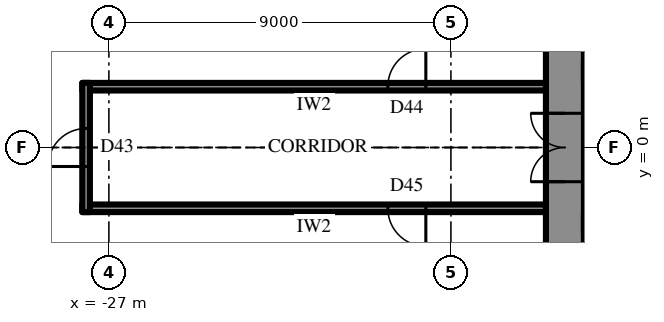
"""IFC4 building model, lengths in metres.
Left out: names, types, materials, properties, quantities, classifications, styles, units other than length and angle.
Written with IfcOpenShell. Run it as: python <this file> out.ifc"""

import sys

from ifc_helpers import new_model, si_unit, direction, frame, frame_2d, origin, place, context, subcontext, project, spatial, rectangle, extrude, element, fill, save


model = new_model("IFC4")
c1 = context("Model", 3, precision=1e-05, world=origin(), true_north=direction((0.0, 1.0)))
c2 = subcontext(c1, "Body", "Model", "MODEL_VIEW")
j1 = project(units=[si_unit("LENGTHUNIT", "METRE"), si_unit("PLANEANGLEUNIT", "RADIAN")], contexts=[c1])
p1 = place(None, origin())
s1 = spatial("IfcSite", under=j1, at=p1, CompositionType="ELEMENT")
p2 = place(p1, origin())
s2 = spatial("IfcBuilding", under=s1, at=p2, CompositionType="ELEMENT")
p3 = place(p2, frame((0.0, 0.0, 219.7)))
s3 = spatial("IfcBuildingStorey", under=s2, at=p3, CompositionType="ELEMENT", Elevation=219.7)
p4 = place(p3, frame((-15.0, 10.7, 0.0), z_axis=(0.0, 0.0, 1.0), x_axis=(0.0, -1.0, 0.0)))
e1 = element("IfcWall", 1, at=p4, inside=s3, PredefinedType="SHEAR", context=c2, shape_type="SweptSolid", body=[
    extrude(rectangle(XDim=21.4, YDim=1.0, at=frame_2d((10.7, 0.0))), origin(), (0.0, 0.0, 1.0), 4.2),
])
p5 = place(p4, frame((9.8, 0.0, 0.0)))
e2 = element("IfcOpeningElement", 2, at=p5, cuts=e1, PredefinedType="OPENING", context=c2, shape_type="SweptSolid", body=[
    extrude(rectangle(XDim=1.8, YDim=2.4, at=frame_2d((0.9, 1.2))), frame((0.0, 0.51, 0.0), z_axis=(0.0, -1.0, 0.0), x_axis=(1.0, 0.0, 0.0)), (0.0, 0.0, 1.0), 1.02),
])
p6 = place(p3, frame((-12.3, -2.0, 0.0), z_axis=(0.0, 0.0, 1.0), x_axis=(-1.0, 0.0, 0.0)))
e3 = element("IfcWall", 3, at=p6, inside=s3, PredefinedType="SHEAR", context=c2, shape_type="SweptSolid", body=[
    extrude(rectangle(XDim=2.2, YDim=0.5, at=frame_2d((1.1, 0.0))), origin(), (0.0, 0.0, 1.0), 4.2),
])
p7 = place(p6, frame((0.8, 0.0, 0.0)))
e4 = element("IfcOpeningElement", 4, at=p7, cuts=e3, PredefinedType="OPENING", context=c2, shape_type="SweptSolid", body=[
    extrude(rectangle(XDim=0.9, YDim=2.2, at=frame_2d((0.45, 1.1))), frame((0.0, 0.26, 0.0), z_axis=(0.0, -1.0, 0.0), x_axis=(1.0, 0.0, 0.0)), (0.0, 0.0, 1.0), 0.52),
])
p8 = place(p3, frame((-31.913, -2.425, 0.0), z_axis=(0.0, 0.0, 1.0), x_axis=(0.500001051461, -0.866024796723, 0.0)))
e5 = element("IfcWall", 5, at=p8, inside=s3, PredefinedType="SOLIDWALL", context=c2, shape_type="SweptSolid", body=[
    extrude(rectangle(XDim=27.713, YDim=0.3, at=frame_2d((13.856, 0.0))), origin(), (0.0, 0.0, 1.0), 2.0),
])
p9 = place(p8, frame((0.959, 0.0, 0.6)))
e6 = element("IfcOpeningElement", 6, at=p9, cuts=e5, PredefinedType="OPENING", context=c2, shape_type="SweptSolid", body=[
    extrude(rectangle(XDim=2.7, YDim=1.15, at=frame_2d((1.35, 0.575))), frame((0.0, 0.16, 0.0), z_axis=(0.0, -1.0, 0.0), x_axis=(1.0, 0.0, 0.0)), (0.0, 0.0, 1.0), 0.32),
])
p10 = place(p8, frame((5.578, 0.0, 0.6)))
e7 = element("IfcOpeningElement", 7, at=p10, cuts=e5, PredefinedType="OPENING", context=c2, shape_type="SweptSolid", body=[
    extrude(rectangle(XDim=2.7, YDim=1.15, at=frame_2d((1.35, 0.575))), frame((0.0, 0.16, 0.0), z_axis=(0.0, -1.0, 0.0), x_axis=(1.0, 0.0, 0.0)), (0.0, 0.0, 1.0), 0.32),
])
p11 = place(p8, frame((10.197, 0.0, 0.6)))
e8 = element("IfcOpeningElement", 8, at=p11, cuts=e5, PredefinedType="OPENING", context=c2, shape_type="SweptSolid", body=[
    extrude(rectangle(XDim=2.7, YDim=1.15, at=frame_2d((1.35, 0.575))), frame((0.0, 0.16, 0.0), z_axis=(0.0, -1.0, 0.0), x_axis=(1.0, 0.0, 0.0)), (0.0, 0.0, 1.0), 0.32),
])
p12 = place(p8, frame((14.816, 0.0, 0.6)))
e9 = element("IfcOpeningElement", 9, at=p12, cuts=e5, PredefinedType="OPENING", context=c2, shape_type="SweptSolid", body=[
    extrude(rectangle(XDim=2.7, YDim=1.15, at=frame_2d((1.35, 0.575))), frame((0.0, 0.16, 0.0), z_axis=(0.0, -1.0, 0.0), x_axis=(1.0, 0.0, 0.0)), (0.0, 0.0, 1.0), 0.32),
])
p13 = place(p8, frame((19.435, 0.0, 0.6)))
e10 = element("IfcOpeningElement", 10, at=p13, cuts=e5, PredefinedType="OPENING", context=c2, shape_type="SweptSolid", body=[
    extrude(rectangle(XDim=2.7, YDim=1.15, at=frame_2d((1.35, 0.575))), frame((0.0, 0.16, 0.0), z_axis=(0.0, -1.0, 0.0), x_axis=(1.0, 0.0, 0.0)), (0.0, 0.0, 1.0), 0.32),
])
p14 = place(p8, frame((24.053, 0.0, 0.6)))
e11 = element("IfcOpeningElement", 11, at=p14, cuts=e5, PredefinedType="OPENING", context=c2, shape_type="SweptSolid", body=[
    extrude(rectangle(XDim=2.7, YDim=1.15, at=frame_2d((1.35, 0.575))), frame((0.0, 0.16, 0.0), z_axis=(0.0, -1.0, 0.0), x_axis=(1.0, 0.0, 0.0)), (0.0, 0.0, 1.0), 0.32),
])
p15 = place(p3, frame((-15.5, 1.6, 0.0), z_axis=(0.0, 0.0, 1.0), x_axis=(-1.0, 0.0, 0.0)))
e12 = element("IfcWall", 12, at=p15, inside=s3, PredefinedType="PARTITIONING", context=c2, shape_type="SweptSolid", body=[
    extrude(rectangle(XDim=12.2, YDim=0.2, at=frame_2d((6.1, 0.0))), origin(), (0.0, 0.0, 1.0), 4.0),
])
p16 = place(p15, frame((3.16, 0.0, 0.0)))
e13 = element("IfcOpeningElement", 13, at=p16, cuts=e12, PredefinedType="OPENING", context=c2, shape_type="SweptSolid", body=[
    extrude(rectangle(XDim=1.0, YDim=2.2, at=frame_2d((0.5, 1.1))), frame((0.0, 0.11, 0.0), z_axis=(0.0, -1.0, 0.0), x_axis=(1.0, 0.0, 0.0)), (0.0, 0.0, 1.0), 0.22),
])
p17 = place(p3, frame((-15.5, -1.6, 0.0), z_axis=(0.0, 0.0, 1.0), x_axis=(-1.0, 0.0, 0.0)))
e14 = element("IfcWall", 14, at=p17, inside=s3, PredefinedType="PARTITIONING", context=c2, shape_type="SweptSolid", body=[
    extrude(rectangle(XDim=12.2, YDim=0.2, at=frame_2d((6.1, 0.0))), origin(), (0.0, 0.0, 1.0), 4.0),
])
p18 = place(p17, frame((3.16, 0.0, 0.0)))
e15 = element("IfcOpeningElement", 15, at=p18, cuts=e14, PredefinedType="OPENING", context=c2, shape_type="SweptSolid", body=[
    extrude(rectangle(XDim=1.0, YDim=2.2, at=frame_2d((0.5, 1.1))), frame((0.0, 0.11, 0.0), z_axis=(0.0, -1.0, 0.0), x_axis=(1.0, 0.0, 0.0)), (0.0, 0.0, 1.0), 0.22),
])
p19 = place(p3, frame((-27.6, -1.7, 0.0), z_axis=(0.0, 0.0, 1.0), x_axis=(0.0, 1.0, 0.0)))
e16 = element("IfcWall", 16, at=p19, inside=s3, PredefinedType="PARTITIONING", context=c2, shape_type="SweptSolid", body=[
    extrude(rectangle(XDim=3.4, YDim=0.2, at=frame_2d((1.7, 0.0))), origin(), (0.0, 0.0, 1.0), 4.0),
])
p20 = place(p19, frame((1.2, 0.0, 0.0)))
e17 = element("IfcOpeningElement", 17, at=p20, cuts=e16, PredefinedType="OPENING", context=c2, shape_type="SweptSolid", body=[
    extrude(rectangle(XDim=1.0, YDim=2.2, at=frame_2d((0.5, 1.1))), frame((0.0, 0.11, 0.0), z_axis=(0.0, -1.0, 0.0), x_axis=(1.0, 0.0, 0.0)), (0.0, 0.0, 1.0), 0.22),
])
p21 = place(p5, frame((1.8, 0.0, 0.0), z_axis=(0.0, 0.0, 1.0), x_axis=(-1.0, 0.0, 0.0)))
e18 = element("IfcDoor", 18, at=p21, inside=s3, OperationType="DOUBLE_DOOR_SINGLE_SWING", PredefinedType="DOOR", context=c2, shape_type="SweptSolid", body=[
    extrude(rectangle(XDim=1.8, YDim=2.4, at=frame_2d((0.9, 1.2))), frame((0.0, 0.025, 0.0), z_axis=(0.0, -1.0, 0.0), x_axis=(1.0, 0.0, 0.0)), (0.0, 0.0, 1.0), 0.05),
])
fill(e2, e18)
p22 = place(p16, frame((1.0, 0.0, 0.0), z_axis=(0.0, 0.0, 1.0), x_axis=(-1.0, 0.0, 0.0)))
e19 = element("IfcDoor", 19, at=p22, inside=s3, OperationType="SINGLE_SWING_LEFT", PredefinedType="DOOR", context=c2, shape_type="SweptSolid", body=[
    extrude(rectangle(XDim=1.0, YDim=2.2, at=frame_2d((0.5, 1.1))), frame((0.0, 0.025, 0.0), z_axis=(0.0, -1.0, 0.0), x_axis=(1.0, 0.0, 0.0)), (0.0, 0.0, 1.0), 0.05),
])
fill(e13, e19)
p23 = place(p18, origin())
e20 = element("IfcDoor", 20, at=p23, inside=s3, OperationType="SINGLE_SWING_RIGHT", PredefinedType="DOOR", context=c2, shape_type="SweptSolid", body=[
    extrude(rectangle(XDim=1.0, YDim=2.2, at=frame_2d((0.5, 1.1))), frame((0.0, 0.025, 0.0), z_axis=(0.0, -1.0, 0.0), x_axis=(1.0, 0.0, 0.0)), (0.0, 0.0, 1.0), 0.05),
])
fill(e15, e20)
p24 = place(p20, origin())
e21 = element("IfcDoor", 21, at=p24, inside=s3, OperationType="SINGLE_SWING_RIGHT", PredefinedType="DOOR", context=c2, shape_type="SweptSolid", body=[
    extrude(rectangle(XDim=1.0, YDim=2.2, at=frame_2d((0.5, 1.1))), frame((0.0, 0.025, 0.0), z_axis=(0.0, -1.0, 0.0), x_axis=(1.0, 0.0, 0.0)), (0.0, 0.0, 1.0), 0.05),
])
fill(e17, e21)
save(model, sys.argv[1])
